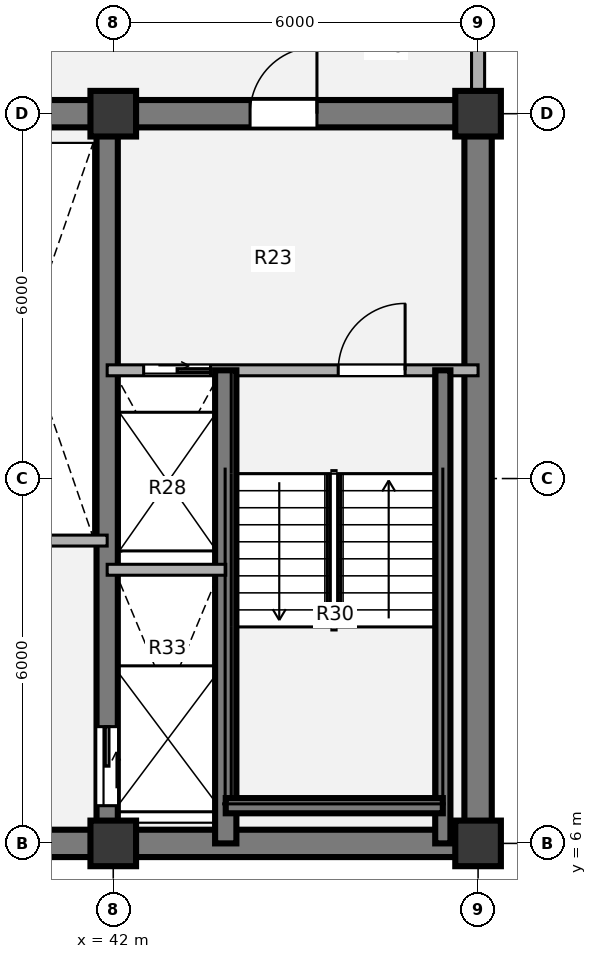
"""IFC4 building model, lengths in metres.
Left out: names, types, materials, properties, quantities, classifications, styles, units other than length and angle.
Written with IfcOpenShell. Run it as: python <this file> out.ifc"""

import sys

from ifc_helpers import new_model, si_unit, direction, frame, frame_2d, origin, origin_2d, place, context, subcontext, project, spatial, rectangle, extrude, source, transform, mapped, element, fill, save


model = new_model("IFC4")
c1 = context("Model", 3, precision=1e-05, world=origin(), true_north=direction((0.0, 1.0)))
c2 = subcontext(c1, "Body", "Model", "MODEL_VIEW")
j1 = project(units=[si_unit("LENGTHUNIT", "METRE"), si_unit("PLANEANGLEUNIT", "RADIAN")], contexts=[c1])
p1 = place(None, origin())
s1 = spatial("IfcSite", under=j1, at=p1, CompositionType="ELEMENT")
p2 = place(p1, origin())
s2 = spatial("IfcBuilding", under=s1, at=p2, CompositionType="ELEMENT")
p3 = place(p2, frame((0.0, 0.0, 175.32)))
s3 = spatial("IfcBuildingStorey", under=s2, at=p3, CompositionType="ELEMENT", Elevation=175.32)
m1 = source(origin(), c2, "Body", "SweptSolid", [
    extrude(rectangle(XDim=0.75, YDim=0.75, at=origin_2d()), origin(), (0.0, 0.0, 1.0), 3.78),
])
for number, where, z_axis, x_axis in (
    (1, (42.0, 6.0, 0.0), (0.0, 0.0, 1.0), (1.0, 0.0, 0.0)),
    (2, (48.0, 6.0, 0.0), (0.0, 0.0, 1.0), (1.0, 0.0, 0.0)),
    (3, (42.0, 18.0, 0.0), (0.0, 0.0, 1.0), (1.0, 0.0, 0.0)),
    (4, (48.0, 18.0, 0.0), (0.0, 0.0, 1.0), (1.0, 0.0, 0.0)),
):
    element("IfcColumn", number, at=place(p3, frame(where, z_axis=z_axis, x_axis=x_axis)), inside=s3, PredefinedType="COLUMN", context=c2, shape_type="MappedRepresentation", body=[
        mapped(m1, transform((0.0, 0.0, 0.0), x_axis=(1.0, 0.0, 0.0), y_axis=(0.0, 1.0, 0.0), z_axis=(0.0, 0.0, 1.0), scale=1.0)),
    ])
p4 = place(p3, frame((48.225, 6.0, 0.0), z_axis=(0.0, 0.0, 1.0), x_axis=(-1.0, 0.0, 0.0)))
e5 = element("IfcWall", 5, at=p4, inside=s3, PredefinedType="SHEAR", context=c2, shape_type="SweptSolid", body=[
    extrude(rectangle(XDim=24.45, YDim=0.45, at=frame_2d((12.225, 0.0))), origin(), (0.0, 0.0, 1.0), 3.78),
])
p5 = place(p3, frame((48.0, 18.0, 0.0), z_axis=(0.0, 0.0, 1.0), x_axis=(0.0, -1.0, 0.0)))
e6 = element("IfcWall", 6, at=p5, inside=s3, PredefinedType="SHEAR", context=c2, shape_type="SweptSolid", body=[
    extrude(rectangle(XDim=12.0, YDim=0.45, at=frame_2d((6.0, 0.0))), origin(), (0.0, 0.0, 1.0), 3.78),
])
p6 = place(p3, frame((38.8, 18.0, 0.0), z_axis=(0.0, 0.0, 1.0), x_axis=(1.0, 0.0, 0.0)))
e7 = element("IfcWall", 7, at=p6, inside=s3, PredefinedType="SHEAR", context=c2, shape_type="SweptSolid", body=[
    extrude(rectangle(XDim=9.425, YDim=0.45, at=frame_2d((4.712, 0.0))), origin(), (0.0, 0.0, 1.0), 3.78),
])
p7 = place(p6, frame((5.45, 0.0, 0.0)))
e8 = element("IfcOpeningElement", 8, at=p7, cuts=e7, PredefinedType="OPENING", context=c2, shape_type="SweptSolid", body=[
    extrude(rectangle(XDim=1.1, YDim=2.1, at=origin_2d()), frame((0.55, 0.235, 1.05), z_axis=(0.0, -1.0, 0.0), x_axis=(1.0, 0.0, 0.0)), (0.0, 0.0, 1.0), 0.47),
])
p8 = place(p3, frame((41.9, 18.0, 0.0), z_axis=(0.0, 0.0, 1.0), x_axis=(0.0, -1.0, 0.0)))
e9 = element("IfcWall", 9, at=p8, inside=s3, PredefinedType="SHEAR", context=c2, shape_type="SweptSolid", body=[
    extrude(rectangle(XDim=12.0, YDim=0.35, at=frame_2d((6.0, 0.0))), origin(), (0.0, 0.0, 1.0), 3.78),
])
p9 = place(p8, frame((10.08, 0.0, 0.0)))
e10 = element("IfcOpeningElement", 10, at=p9, cuts=e9, PredefinedType="OPENING", context=c2, shape_type="SweptSolid", body=[
    extrude(rectangle(XDim=1.3, YDim=2.1, at=origin_2d()), frame((0.65, 0.185, 1.05), z_axis=(0.0, -1.0, 0.0), x_axis=(1.0, 0.0, 0.0)), (0.0, 0.0, 1.0), 0.37),
])
p10 = place(p3, frame((48.0, 21.05, 0.0), z_axis=(0.0, 0.0, 1.0), x_axis=(0.0, -1.0, 0.0)))
e11 = element("IfcWall", 11, at=p10, inside=s3, PredefinedType="SOLIDWALL", context=c2, shape_type="SweptSolid", body=[
    extrude(rectangle(XDim=2.695, YDim=0.215, at=frame_2d((1.348, 0.0))), origin(), (0.0, 0.0, 1.0), 2.718),
])
p11 = place(p3, frame((39.35, 10.98, 0.0), z_axis=(0.0, 0.0, 1.0), x_axis=(1.0, 0.0, 0.0)))
e12 = element("IfcWall", 12, at=p11, inside=s3, PredefinedType="PARTITIONING", context=c2, shape_type="SweptSolid", body=[
    extrude(rectangle(XDim=2.55, YDim=0.18, at=frame_2d((1.275, 0.0))), origin(), (0.0, 0.0, 1.0), 3.5),
])
p12 = place(p3, frame((41.9, 13.78, 0.0), z_axis=(0.0, 0.0, 1.0), x_axis=(1.0, 0.0, 0.0)))
e13 = element("IfcWall", 13, at=p12, inside=s3, PredefinedType="PARTITIONING", context=c2, shape_type="SweptSolid", body=[
    extrude(rectangle(XDim=6.1, YDim=0.18, at=frame_2d((3.05, 0.0))), origin(), (0.0, 0.0, 1.0), 3.5),
])
p13 = place(p12, frame((0.6, 0.0, 0.0)))
e14 = element("IfcOpeningElement", 14, at=p13, cuts=e13, PredefinedType="OPENING", context=c2, shape_type="SweptSolid", body=[
    extrude(rectangle(XDim=1.1, YDim=2.1, at=origin_2d()), frame((0.55, 0.1, 1.05), z_axis=(0.0, -1.0, 0.0), x_axis=(1.0, 0.0, 0.0)), (0.0, 0.0, 1.0), 0.2),
])
p14 = place(p12, frame((3.8, 0.0, 0.0)))
e15 = element("IfcOpeningElement", 15, at=p14, cuts=e13, PredefinedType="OPENING", context=c2, shape_type="SweptSolid", body=[
    extrude(rectangle(XDim=1.1, YDim=2.1, at=origin_2d()), frame((0.55, 0.1, 1.05), z_axis=(0.0, -1.0, 0.0), x_axis=(1.0, 0.0, 0.0)), (0.0, 0.0, 1.0), 0.2),
])
p15 = place(p3, frame((43.85, 6.0, 0.0), z_axis=(0.0, 0.0, 1.0), x_axis=(0.0, 1.0, 0.0)))
e16 = element("IfcWall", 16, at=p15, inside=s3, PredefinedType="SHEAR", context=c2, shape_type="SweptSolid", body=[
    extrude(rectangle(XDim=7.78, YDim=0.35, at=frame_2d((3.89, 0.0))), origin(), (0.0, 0.0, 1.0), 3.85),
])
p16 = place(p3, frame((47.42, 6.0, 0.0), z_axis=(0.0, 0.0, 1.0), x_axis=(0.0, 1.0, 0.0)))
e17 = element("IfcWall", 17, at=p16, inside=s3, PredefinedType="SHEAR", context=c2, shape_type="SweptSolid", body=[
    extrude(rectangle(XDim=7.78, YDim=0.25, at=frame_2d((3.89, 0.0))), origin(), (0.0, 0.0, 1.0), 3.85),
])
p17 = place(p3, frame((43.85, 6.62, 0.0), z_axis=(0.0, 0.0, 1.0), x_axis=(1.0, 0.0, 0.0)))
e18 = element("IfcWall", 18, at=p17, inside=s3, PredefinedType="SHEAR", context=c2, shape_type="SweptSolid", body=[
    extrude(rectangle(XDim=3.57, YDim=0.25, at=frame_2d((1.785, 0.0))), origin(), (0.0, 0.0, 1.0), 3.85),
])
p18 = place(p3, frame((41.9, 10.5, 0.0), z_axis=(0.0, 0.0, 1.0), x_axis=(1.0, 0.0, 0.0)))
e19 = element("IfcWall", 19, at=p18, inside=s3, PredefinedType="PARTITIONING", context=c2, shape_type="SweptSolid", body=[
    extrude(rectangle(XDim=1.95, YDim=0.18, at=frame_2d((0.975, 0.0))), origin(), (0.0, 0.0, 1.0), 3.5),
])
m2 = source(origin(), c2, "Body", "SweptSolid", [
    extrude(rectangle(XDim=1.1, YDim=2.1, at=origin_2d()), frame((0.55, 0.025, 1.05), z_axis=(0.0, -1.0, 0.0), x_axis=(1.0, 0.0, 0.0)), (0.0, 0.0, 1.0), 0.05),
])
p19 = place(p13, origin())
e20 = element("IfcDoor", 20, at=p19, inside=s3, OperationType="SLIDING_TO_RIGHT", PredefinedType="DOOR", context=c2, shape_type="MappedRepresentation", body=[
    mapped(m2, transform((0.0, 0.0, 0.0), x_axis=(1.0, 0.0, 0.0), y_axis=(0.0, 1.0, 0.0), z_axis=(0.0, 0.0, 1.0), scale=1.0)),
])
fill(e14, e20)
m3 = source(origin(), c2, "Body", "SweptSolid", [
    extrude(rectangle(XDim=1.1, YDim=2.1, at=origin_2d()), frame((0.55, 0.025, 1.05), z_axis=(0.0, -1.0, 0.0), x_axis=(1.0, 0.0, 0.0)), (0.0, 0.0, 1.0), 0.05),
])
p20 = place(p14, origin())
e21 = element("IfcDoor", 21, at=p20, inside=s3, OperationType="SINGLE_SWING_RIGHT", PredefinedType="DOOR", context=c2, shape_type="MappedRepresentation", body=[
    mapped(m3, transform((0.0, 0.0, 0.0), x_axis=(1.0, 0.0, 0.0), y_axis=(0.0, 1.0, 0.0), z_axis=(0.0, 0.0, 1.0), scale=1.0)),
])
fill(e15, e21)
m4 = source(origin(), c2, "Body", "SweptSolid", [
    extrude(rectangle(XDim=1.3, YDim=2.1, at=origin_2d()), frame((0.65, 0.025, 1.05), z_axis=(0.0, -1.0, 0.0), x_axis=(1.0, 0.0, 0.0)), (0.0, 0.0, 1.0), 0.05),
])
p21 = place(p9, origin())
e22 = element("IfcDoor", 22, at=p21, inside=s3, OperationType="SLIDING_TO_LEFT", PredefinedType="DOOR", context=c2, shape_type="MappedRepresentation", body=[
    mapped(m4, transform((0.0, 0.0, 0.0), x_axis=(1.0, 0.0, 0.0), y_axis=(0.0, 1.0, 0.0), z_axis=(0.0, 0.0, 1.0), scale=1.0)),
])
fill(e10, e22)
m5 = source(origin(), c2, "Body", "SweptSolid", [
    extrude(rectangle(XDim=1.1, YDim=2.1, at=origin_2d()), frame((0.55, 0.025, 1.05), z_axis=(0.0, -1.0, 0.0), x_axis=(1.0, 0.0, 0.0)), (0.0, 0.0, 1.0), 0.05),
])
p22 = place(p7, origin())
e23 = element("IfcDoor", 23, at=p22, inside=s3, OperationType="SINGLE_SWING_RIGHT", PredefinedType="DOOR", context=c2, shape_type="MappedRepresentation", body=[
    mapped(m5, transform((0.0, 0.0, 0.0), x_axis=(1.0, 0.0, 0.0), y_axis=(0.0, 1.0, 0.0), z_axis=(0.0, 0.0, 1.0), scale=1.0)),
])
fill(e8, e23)
save(model, sys.argv[1])
